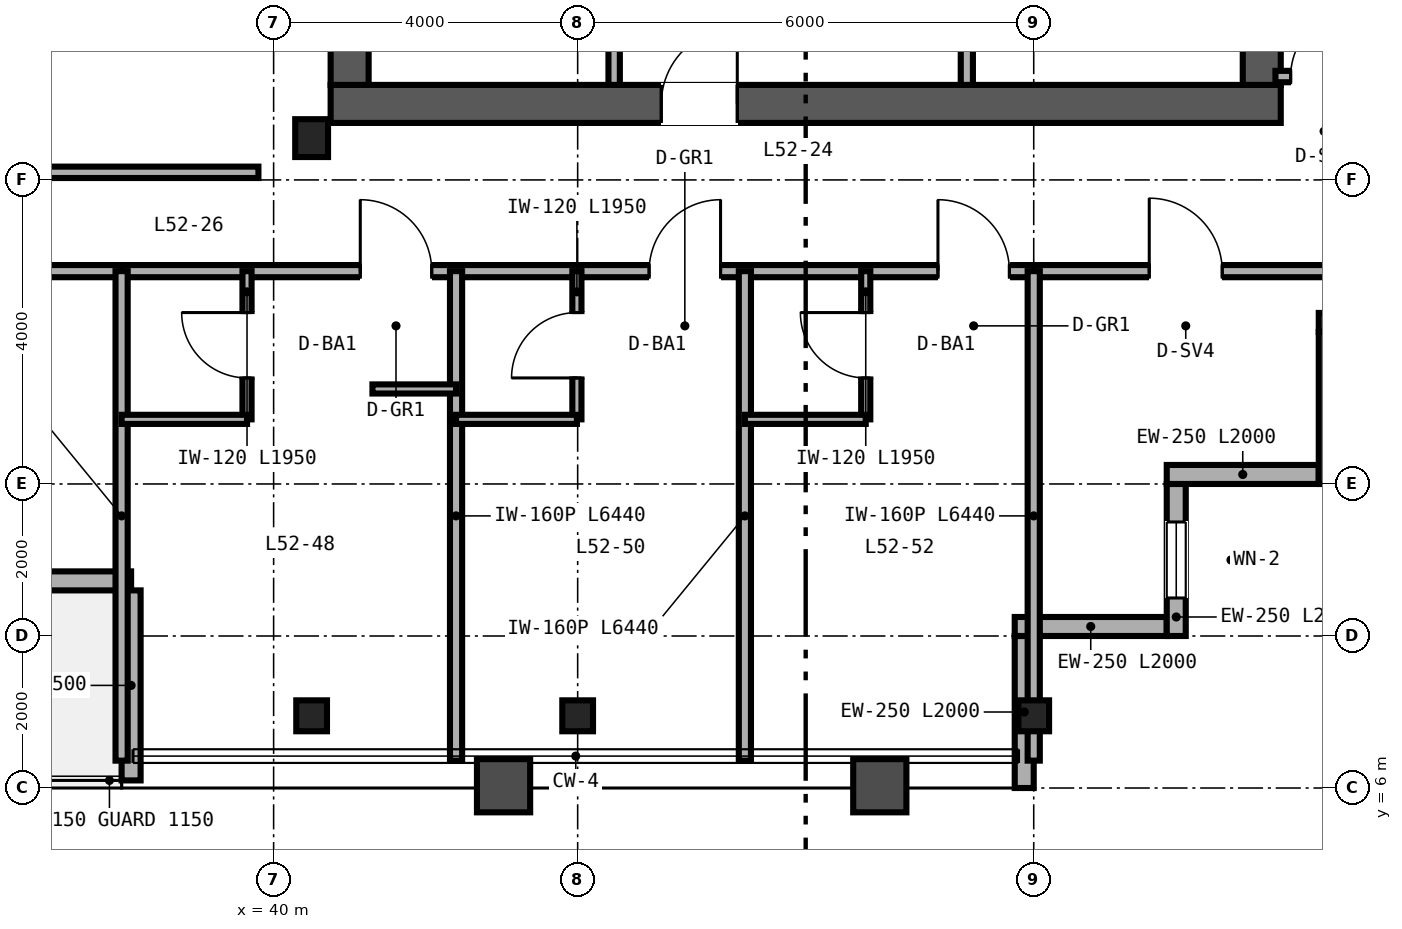
"""IFC4 building model, lengths in metres.
Left out: names, types, materials, properties, quantities, classifications, styles, units other than length and angle.
Written with IfcOpenShell. Run it as: python <this file> out.ifc"""

import sys

from ifc_helpers import new_model, si_unit, direction, frame, frame_2d, origin, origin_2d, place, context, subcontext, project, spatial, rectangle, i_section, extrude, source, transform, mapped, element, fill, save


model = new_model("IFC4")
c1 = context("Model", 3, precision=1e-05, world=origin(), true_north=direction((0.0, 1.0)))
c2 = subcontext(c1, "Body", "Model", "MODEL_VIEW")
j1 = project(units=[si_unit("LENGTHUNIT", "METRE"), si_unit("PLANEANGLEUNIT", "RADIAN")], contexts=[c1])
p1 = place(None, origin())
s1 = spatial("IfcSite", under=j1, at=p1, CompositionType="ELEMENT")
p2 = place(p1, origin())
s2 = spatial("IfcBuilding", under=s1, at=p2, CompositionType="ELEMENT")
p3 = place(p2, frame((0.0, 0.0, 206.4)))
s3 = spatial("IfcBuildingStorey", under=s2, at=p3, CompositionType="ELEMENT", Elevation=206.4)
p4 = place(p3, frame((40.75, 15.0, 0.0), z_axis=(0.0, 0.0, 1.0), x_axis=(1.0, 0.0, 0.0)))
e1 = element("IfcWall", 1, at=p4, inside=s3, PredefinedType="SHEAR", context=c2, shape_type="SweptSolid", body=[
    extrude(rectangle(XDim=12.5, YDim=0.5, at=frame_2d((6.25, 0.0))), origin(), (0.0, 0.0, 1.0), 3.37),
])
p5 = place(p4, frame((4.35, 0.0, 0.0)))
e2 = element("IfcOpeningElement", 2, at=p5, cuts=e1, PredefinedType="OPENING", context=c2, shape_type="SweptSolid", body=[
    extrude(rectangle(XDim=1.0, YDim=2.15, at=frame_2d((0.5, 1.075))), frame((0.0, 0.26, 0.0), z_axis=(0.0, -1.0, 0.0), x_axis=(1.0, 0.0, 0.0)), (0.0, 0.0, 1.0), 0.52),
])
for number, where, z_axis, x_axis in (
    (3, (41.0, 15.25, 0.0), (0.0, 0.0, 1.0), (0.0, 1.0, 0.0)),
    (4, (53.0, 15.25, 0.0), (0.0, 0.0, 1.0), (0.0, 1.0, 0.0)),
):
    element("IfcWall", number, at=place(p3, frame(where, z_axis=z_axis, x_axis=x_axis)), inside=s3, PredefinedType="SHEAR", context=c2, shape_type="SweptSolid", body=[
        extrude(rectangle(XDim=21.5, YDim=0.5, at=frame_2d((10.75, 0.0))), origin(), (0.0, 0.0, 1.0), 3.37),
    ])
m1 = source(origin(), c2, "Body", "SweptSolid", [
    extrude(i_section(OverallWidth=0.432, OverallDepth=0.498, WebThickness=0.056, FlangeThickness=0.089, FilletRadius=0.025, at=origin_2d()), origin(), (0.0, 0.0, 1.0), 3.37),
])
p6 = place(p3, frame((40.5, 14.55, 0.0), z_axis=(0.0, 0.0, 1.0), x_axis=(1.0, 0.0, 0.0)))
e5 = element("IfcColumn", 5, at=p6, inside=s3, PredefinedType="COLUMN", context=c2, shape_type="MappedRepresentation", body=[
    mapped(m1, transform((0.0, 0.0, 0.0), scale=1.0)),
])
m2 = source(origin(), c2, "Body", "SweptSolid", [
    extrude(i_section(OverallWidth=0.404, OverallDepth=0.407, WebThickness=0.027, FlangeThickness=0.044, FilletRadius=0.025, at=origin_2d()), origin(), (0.0, 0.0, 1.0), 3.37),
])
for number, where, z_axis, x_axis in (
    (6, (40.5, 6.95, 0.0), (0.0, 0.0, 1.0), (1.0, 0.0, 0.0)),
    (7, (44.0, 6.95, 0.0), (0.0, 0.0, 1.0), (1.0, 0.0, 0.0)),
    (8, (50.0, 6.95, 0.0), (0.0, 0.0, 1.0), (1.0, 0.0, 0.0)),
):
    element("IfcColumn", number, at=place(p3, frame(where, z_axis=z_axis, x_axis=x_axis)), inside=s3, PredefinedType="COLUMN", context=c2, shape_type="MappedRepresentation", body=[
        mapped(m2, transform((0.0, 0.0, 0.0), scale=1.0)),
    ])
p7 = place(p3, frame((49.875, 6.0, 0.0), z_axis=(0.0, 0.0, 1.0), x_axis=(0.0, 1.0, 0.0)))
e9 = element("IfcWall", 9, at=p7, inside=s3, PredefinedType="SOLIDWALL", context=c2, shape_type="SweptSolid", body=[
    extrude(rectangle(XDim=2.0, YDim=0.25, at=frame_2d((1.0, 0.0))), origin(), (0.0, 0.0, 1.0), 2.677),
])
p8 = place(p3, frame((49.75, 8.125, 0.0), z_axis=(0.0, 0.0, 1.0), x_axis=(1.0, 0.0, 0.0)))
e10 = element("IfcWall", 10, at=p8, inside=s3, PredefinedType="SOLIDWALL", context=c2, shape_type="SweptSolid", body=[
    extrude(rectangle(XDim=2.0, YDim=0.25, at=frame_2d((1.0, 0.0))), origin(), (0.0, 0.0, 1.0), 3.37),
])
p9 = place(p3, frame((51.875, 8.0, 0.0), z_axis=(0.0, 0.0, 1.0), x_axis=(0.0, 1.0, 0.0)))
e11 = element("IfcWall", 11, at=p9, inside=s3, PredefinedType="SOLIDWALL", context=c2, shape_type="SweptSolid", body=[
    extrude(rectangle(XDim=2.0, YDim=0.25, at=frame_2d((1.0, 0.0))), origin(), (0.0, 0.0, 1.0), 3.37),
])
p10 = place(p9, frame((0.5, 0.0, 0.85)))
e12 = element("IfcOpeningElement", 12, at=p10, cuts=e11, PredefinedType="OPENING", context=c2, shape_type="SweptSolid", body=[
    extrude(rectangle(XDim=1.0, YDim=1.9, at=frame_2d((0.5, 0.95))), frame((0.0, 0.135, 0.0), z_axis=(0.0, -1.0, 0.0), x_axis=(1.0, 0.0, 0.0)), (0.0, 0.0, 1.0), 0.27),
])
for number, where, z_axis, x_axis in (
    (13, (51.75, 10.125, 0.0), (0.0, 0.0, 1.0), (1.0, 0.0, 0.0)),
    (14, (53.875, 10.0, 0.0), (0.0, 0.0, 1.0), (0.0, 1.0, 0.0)),
):
    element("IfcWall", number, at=place(p3, frame(where, z_axis=z_axis, x_axis=x_axis)), inside=s3, PredefinedType="SOLIDWALL", context=c2, shape_type="SweptSolid", body=[
        extrude(rectangle(XDim=2.0, YDim=0.25, at=frame_2d((1.0, 0.0))), origin(), (0.0, 0.0, 1.0), 3.37),
    ])
p11 = place(p3, frame((53.75, 12.125, 0.0), z_axis=(0.0, 0.0, 1.0), x_axis=(1.0, 0.0, 0.0)))
e15 = element("IfcWall", 15, at=p11, inside=s3, PredefinedType="SOLIDWALL", context=c2, shape_type="SweptSolid", body=[
    extrude(rectangle(XDim=2.25, YDim=0.25, at=frame_2d((1.125, 0.0))), origin(), (0.0, 0.0, 1.0), 3.37),
])
p12 = place(p3, frame((25.875, 8.725, 0.0), z_axis=(0.0, 0.0, 1.0), x_axis=(1.0, 0.0, 0.0)))
e16 = element("IfcWall", 16, at=p12, inside=s3, PredefinedType="SOLIDWALL", context=c2, shape_type="SweptSolid", body=[
    extrude(rectangle(XDim=12.25, YDim=0.25, at=frame_2d((6.125, 0.0))), origin(), (0.0, 0.0, 1.0), 3.37),
])
p13 = place(p12, frame((5.6, 0.0, 0.0)))
e17 = element("IfcOpeningElement", 17, at=p13, cuts=e16, PredefinedType="OPENING", context=c2, shape_type="SweptSolid", body=[
    extrude(rectangle(XDim=1.05, YDim=2.15, at=frame_2d((0.525, 1.075))), frame((0.0, 0.135, 0.0), z_axis=(0.0, -1.0, 0.0), x_axis=(1.0, 0.0, 0.0)), (0.0, 0.0, 1.0), 0.27),
])
p14 = place(p3, frame((38.125, 6.1, 0.0), z_axis=(0.0, 0.0, 1.0), x_axis=(0.0, 1.0, 0.0)))
e18 = element("IfcWall", 18, at=p14, inside=s3, PredefinedType="SOLIDWALL", context=c2, shape_type="SweptSolid", body=[
    extrude(rectangle(XDim=2.5, YDim=0.25, at=frame_2d((1.25, 0.0))), origin(), (0.0, 0.0, 1.0), 2.443),
])
p15 = place(p3, frame((49.12, 15.25, 0.0), z_axis=(0.0, 0.0, 1.0), x_axis=(0.0, 1.0, 0.0)))
e19 = element("IfcWall", 19, at=p15, inside=s3, PredefinedType="PARTITIONING", context=c2, shape_type="SweptSolid", body=[
    extrude(rectangle(XDim=16.13, YDim=0.16, at=frame_2d((8.065, 0.0))), origin(), (0.0, 0.0, 1.0), 2.443),
])
p16 = place(p15, frame((4.0, 0.0, 0.0)))
e20 = element("IfcOpeningElement", 20, at=p16, cuts=e19, PredefinedType="OPENING", context=c2, shape_type="SweptSolid", body=[
    extrude(rectangle(XDim=0.92, YDim=2.15, at=frame_2d((0.46, 1.075))), frame((0.0, 0.09, 0.0), z_axis=(0.0, -1.0, 0.0), x_axis=(1.0, 0.0, 0.0)), (0.0, 0.0, 1.0), 0.18),
])
p17 = place(p15, frame((12.0, 0.0, 0.0)))
e21 = element("IfcOpeningElement", 21, at=p17, cuts=e19, PredefinedType="OPENING", context=c2, shape_type="SweptSolid", body=[
    extrude(rectangle(XDim=0.92, YDim=2.15, at=frame_2d((0.46, 1.075))), frame((0.0, 0.09, 0.0), z_axis=(0.0, -1.0, 0.0), x_axis=(1.0, 0.0, 0.0)), (0.0, 0.0, 1.0), 0.18),
])
p18 = place(p3, frame((44.48, 15.25, 0.0), z_axis=(0.0, 0.0, 1.0), x_axis=(0.0, 1.0, 0.0)))
e22 = element("IfcWall", 22, at=p18, inside=s3, PredefinedType="PARTITIONING", context=c2, shape_type="SweptSolid", body=[
    extrude(rectangle(XDim=11.63, YDim=0.15, at=frame_2d((5.815, 0.0))), origin(), (0.0, 0.0, 1.0), 3.37),
])
p19 = place(p18, frame((4.5, 0.0, 0.0)))
e23 = element("IfcOpeningElement", 23, at=p19, cuts=e22, PredefinedType="OPENING", context=c2, shape_type="SweptSolid", body=[
    extrude(rectangle(XDim=0.92, YDim=2.15, at=frame_2d((0.46, 1.075))), frame((0.0, 0.085, 0.0), z_axis=(0.0, -1.0, 0.0), x_axis=(1.0, 0.0, 0.0)), (0.0, 0.0, 1.0), 0.17),
])
p20 = place(p3, frame((24.2, 14.1, 0.0), z_axis=(0.0, 0.0, 1.0), x_axis=(1.0, 0.0, 0.0)))
e24 = element("IfcWall", 24, at=p20, inside=s3, PredefinedType="PARTITIONING", context=c2, shape_type="SweptSolid", body=[
    extrude(rectangle(XDim=15.6, YDim=0.15, at=frame_2d((7.8, 0.0))), origin(), (0.0, 0.0, 1.0), 3.37),
])
p21 = place(p20, frame((3.0, 0.0, 0.0)))
e25 = element("IfcOpeningElement", 25, at=p21, cuts=e24, PredefinedType="OPENING", context=c2, shape_type="SweptSolid", body=[
    extrude(rectangle(XDim=0.9, YDim=2.15, at=frame_2d((0.45, 1.075))), frame((0.0, 0.085, 0.0), z_axis=(0.0, -1.0, 0.0), x_axis=(1.0, 0.0, 0.0)), (0.0, 0.0, 1.0), 0.17),
])
p22 = place(p20, frame((11.0, 0.0, 0.0)))
e26 = element("IfcOpeningElement", 26, at=p22, cuts=e24, PredefinedType="OPENING", context=c2, shape_type="SweptSolid", body=[
    extrude(rectangle(XDim=0.9, YDim=2.15, at=frame_2d((0.45, 1.075))), frame((0.0, 0.085, 0.0), z_axis=(0.0, -1.0, 0.0), x_axis=(1.0, 0.0, 0.0)), (0.0, 0.0, 1.0), 0.17),
])
p23 = place(p3, frame((53.18, 15.36, 0.0), z_axis=(0.0, 0.0, 1.0), x_axis=(1.0, 0.0, 0.0)))
e27 = element("IfcWall", 27, at=p23, inside=s3, PredefinedType="PARTITIONING", context=c2, shape_type="SweptSolid", body=[
    extrude(rectangle(XDim=2.66, YDim=0.15, at=frame_2d((1.33, 0.0))), origin(), (0.0, 0.0, 1.0), 2.591),
])
p24 = place(p23, frame((0.2, 0.0, 0.0)))
e28 = element("IfcOpeningElement", 28, at=p24, cuts=e27, PredefinedType="OPENING", context=c2, shape_type="SweptSolid", body=[
    extrude(rectangle(XDim=0.88, YDim=2.15, at=frame_2d((0.44, 1.075))), frame((0.0, 0.085, 0.0), z_axis=(0.0, -1.0, 0.0), x_axis=(1.0, 0.0, 0.0)), (0.0, 0.0, 1.0), 0.17),
])
p25 = place(p3, frame((50.0, 12.8, 0.0), z_axis=(0.0, 0.0, 1.0), x_axis=(1.0, 0.0, 0.0)))
e29 = element("IfcWall", 29, at=p25, inside=s3, PredefinedType="PARTITIONING", context=c2, shape_type="SweptSolid", body=[
    extrude(rectangle(XDim=4.0, YDim=0.16, at=frame_2d((2.0, 0.0))), origin(), (0.0, 0.0, 1.0), 3.37),
])
p26 = place(p25, frame((1.52, 0.0, 0.0)))
e30 = element("IfcOpeningElement", 30, at=p26, cuts=e29, PredefinedType="OPENING", context=c2, shape_type="SweptSolid", body=[
    extrude(rectangle(XDim=0.96, YDim=2.15, at=frame_2d((0.48, 1.075))), frame((0.0, 0.09, 0.0), z_axis=(0.0, -1.0, 0.0), x_axis=(1.0, 0.0, 0.0)), (0.0, 0.0, 1.0), 0.18),
])
p27 = place(p3, frame((26.0, 12.8, 0.0), z_axis=(0.0, 0.0, 1.0), x_axis=(1.0, 0.0, 0.0)))
e31 = element("IfcWall", 31, at=p27, inside=s3, PredefinedType="PARTITIONING", context=c2, shape_type="SweptSolid", body=[
    extrude(rectangle(XDim=12.0, YDim=0.16, at=frame_2d((6.0, 0.0))), origin(), (0.0, 0.0, 1.0), 3.37),
])
p28 = place(p27, frame((5.2, 0.0, 0.0)))
e32 = element("IfcOpeningElement", 32, at=p28, cuts=e31, PredefinedType="OPENING", context=c2, shape_type="SweptSolid", body=[
    extrude(rectangle(XDim=0.96, YDim=2.15, at=frame_2d((0.48, 1.075))), frame((0.0, 0.09, 0.0), z_axis=(0.0, -1.0, 0.0), x_axis=(1.0, 0.0, 0.0)), (0.0, 0.0, 1.0), 0.18),
])
p29 = place(p3, frame((38.0, 12.8, 0.0), z_axis=(0.0, 0.0, 1.0), x_axis=(1.0, 0.0, 0.0)))
e33 = element("IfcWall", 33, at=p29, inside=s3, PredefinedType="PARTITIONING", context=c2, shape_type="SweptSolid", body=[
    extrude(rectangle(XDim=12.0, YDim=0.16, at=frame_2d((6.0, 0.0))), origin(), (0.0, 0.0, 1.0), 2.913),
])
p30 = place(p29, frame((3.14, 0.0, 0.0)))
e34 = element("IfcOpeningElement", 34, at=p30, cuts=e33, PredefinedType="OPENING", context=c2, shape_type="SweptSolid", body=[
    extrude(rectangle(XDim=0.94, YDim=2.15, at=frame_2d((0.47, 1.075))), frame((0.0, 0.09, 0.0), z_axis=(0.0, -1.0, 0.0), x_axis=(1.0, 0.0, 0.0)), (0.0, 0.0, 1.0), 0.18),
])
p31 = place(p29, frame((6.94, 0.0, 0.0)))
e35 = element("IfcOpeningElement", 35, at=p31, cuts=e33, PredefinedType="OPENING", context=c2, shape_type="SweptSolid", body=[
    extrude(rectangle(XDim=0.94, YDim=2.15, at=frame_2d((0.47, 1.075))), frame((0.0, 0.09, 0.0), z_axis=(0.0, -1.0, 0.0), x_axis=(1.0, 0.0, 0.0)), (0.0, 0.0, 1.0), 0.18),
])
p32 = place(p29, frame((10.74, 0.0, 0.0)))
e36 = element("IfcOpeningElement", 36, at=p32, cuts=e33, PredefinedType="OPENING", context=c2, shape_type="SweptSolid", body=[
    extrude(rectangle(XDim=0.94, YDim=2.15, at=frame_2d((0.47, 1.075))), frame((0.0, 0.09, 0.0), z_axis=(0.0, -1.0, 0.0), x_axis=(1.0, 0.0, 0.0)), (0.0, 0.0, 1.0), 0.18),
])
p33 = place(p3, frame((38.0, 6.36, 0.0), z_axis=(0.0, 0.0, 1.0), x_axis=(0.0, 1.0, 0.0)))
e37 = element("IfcWall", 37, at=p33, inside=s3, PredefinedType="PARTITIONING", context=c2, shape_type="SweptSolid", body=[
    extrude(rectangle(XDim=6.44, YDim=0.16, at=frame_2d((3.22, 0.0))), origin(), (0.0, 0.0, 1.0), 2.443),
])
p34 = place(p3, frame((50.0, 6.36, 0.0), z_axis=(0.0, 0.0, 1.0), x_axis=(0.0, 1.0, 0.0)))
e38 = element("IfcWall", 38, at=p34, inside=s3, PredefinedType="PARTITIONING", context=c2, shape_type="SweptSolid", body=[
    extrude(rectangle(XDim=6.44, YDim=0.16, at=frame_2d((3.22, 0.0))), origin(), (0.0, 0.0, 1.0), 2.677),
])
p35 = place(p3, frame((42.4, 6.36, 0.0), z_axis=(0.0, 0.0, 1.0), x_axis=(0.0, 1.0, 0.0)))
e39 = element("IfcWall", 39, at=p35, inside=s3, PredefinedType="PARTITIONING", context=c2, shape_type="SweptSolid", body=[
    extrude(rectangle(XDim=6.44, YDim=0.16, at=frame_2d((3.22, 0.0))), origin(), (0.0, 0.0, 1.0), 2.833),
])
p36 = place(p3, frame((39.65, 10.85, 0.0), z_axis=(0.0, 0.0, 1.0), x_axis=(0.0, 1.0, 0.0)))
e40 = element("IfcWall", 40, at=p36, inside=s3, PredefinedType="PARTITIONING", context=c2, shape_type="SweptSolid", body=[
    extrude(rectangle(XDim=1.95, YDim=0.12, at=frame_2d((0.975, 0.0))), origin(), (0.0, 0.0, 1.0), 3.37),
])
p37 = place(p36, frame((0.545, 0.0, 0.0)))
e41 = element("IfcOpeningElement", 41, at=p37, cuts=e40, PredefinedType="OPENING", context=c2, shape_type="SweptSolid", body=[
    extrude(rectangle(XDim=0.86, YDim=2.1, at=frame_2d((0.43, 1.05))), frame((0.0, 0.07, 0.0), z_axis=(0.0, -1.0, 0.0), x_axis=(1.0, 0.0, 0.0)), (0.0, 0.0, 1.0), 0.14),
])
p38 = place(p3, frame((38.0, 10.85, 0.0), z_axis=(0.0, 0.0, 1.0), x_axis=(1.0, 0.0, 0.0)))
e42 = element("IfcWall", 42, at=p38, inside=s3, PredefinedType="PARTITIONING", context=c2, shape_type="SweptSolid", body=[
    extrude(rectangle(XDim=1.65, YDim=0.12, at=frame_2d((0.825, 0.0))), origin(), (0.0, 0.0, 1.0), 3.37),
])
p39 = place(p3, frame((41.3, 11.25, 0.0), z_axis=(0.0, 0.0, 1.0), x_axis=(1.0, 0.0, 0.0)))
e43 = element("IfcWall", 43, at=p39, inside=s3, PredefinedType="PARTITIONING", context=c2, shape_type="SweptSolid", body=[
    extrude(rectangle(XDim=1.1, YDim=0.12, at=frame_2d((0.55, 0.0))), origin(), (0.0, 0.0, 1.0), 3.37),
])
p40 = place(p3, frame((46.2, 6.36, 0.0), z_axis=(0.0, 0.0, 1.0), x_axis=(0.0, 1.0, 0.0)))
e44 = element("IfcWall", 44, at=p40, inside=s3, PredefinedType="PARTITIONING", context=c2, shape_type="SweptSolid", body=[
    extrude(rectangle(XDim=6.44, YDim=0.16, at=frame_2d((3.22, 0.0))), origin(), (0.0, 0.0, 1.0), 2.677),
])
p41 = place(p3, frame((43.99, 10.85, 0.0), z_axis=(0.0, 0.0, 1.0), x_axis=(0.0, 1.0, 0.0)))
e45 = element("IfcWall", 45, at=p41, inside=s3, PredefinedType="PARTITIONING", context=c2, shape_type="SweptSolid", body=[
    extrude(rectangle(XDim=1.95, YDim=0.12, at=frame_2d((0.975, 0.0))), origin(), (0.0, 0.0, 1.0), 3.37),
])
p42 = place(p41, frame((0.545, 0.0, 0.0)))
e46 = element("IfcOpeningElement", 46, at=p42, cuts=e45, PredefinedType="OPENING", context=c2, shape_type="SweptSolid", body=[
    extrude(rectangle(XDim=0.86, YDim=2.1, at=frame_2d((0.43, 1.05))), frame((0.0, 0.07, 0.0), z_axis=(0.0, -1.0, 0.0), x_axis=(1.0, 0.0, 0.0)), (0.0, 0.0, 1.0), 0.14),
])
p43 = place(p3, frame((42.4, 10.85, 0.0), z_axis=(0.0, 0.0, 1.0), x_axis=(1.0, 0.0, 0.0)))
e47 = element("IfcWall", 47, at=p43, inside=s3, PredefinedType="PARTITIONING", context=c2, shape_type="SweptSolid", body=[
    extrude(rectangle(XDim=1.59, YDim=0.12, at=frame_2d((0.795, 0.0))), origin(), (0.0, 0.0, 1.0), 3.37),
])
p44 = place(p3, frame((47.79, 10.85, 0.0), z_axis=(0.0, 0.0, 1.0), x_axis=(0.0, 1.0, 0.0)))
e48 = element("IfcWall", 48, at=p44, inside=s3, PredefinedType="PARTITIONING", context=c2, shape_type="SweptSolid", body=[
    extrude(rectangle(XDim=1.95, YDim=0.12, at=frame_2d((0.975, 0.0))), origin(), (0.0, 0.0, 1.0), 3.37),
])
p45 = place(p44, frame((0.545, 0.0, 0.0)))
e49 = element("IfcOpeningElement", 49, at=p45, cuts=e48, PredefinedType="OPENING", context=c2, shape_type="SweptSolid", body=[
    extrude(rectangle(XDim=0.86, YDim=2.1, at=frame_2d((0.43, 1.05))), frame((0.0, 0.07, 0.0), z_axis=(0.0, -1.0, 0.0), x_axis=(1.0, 0.0, 0.0)), (0.0, 0.0, 1.0), 0.14),
])
p46 = place(p3, frame((46.2, 10.85, 0.0), z_axis=(0.0, 0.0, 1.0), x_axis=(1.0, 0.0, 0.0)))
e50 = element("IfcWall", 50, at=p46, inside=s3, PredefinedType="PARTITIONING", context=c2, shape_type="SweptSolid", body=[
    extrude(rectangle(XDim=1.59, YDim=0.12, at=frame_2d((0.795, 0.0))), origin(), (0.0, 0.0, 1.0), 3.37),
])
m3 = source(origin(), c2, "Body", "SweptSolid", [
    extrude(rectangle(XDim=1.0, YDim=1.9, at=frame_2d((0.5, 0.95))), frame((0.0, 0.03, 0.0), z_axis=(0.0, -1.0, 0.0), x_axis=(1.0, 0.0, 0.0)), (0.0, 0.0, 1.0), 0.06),
])
p47 = place(p10, origin())
e51 = element("IfcWindow", 51, at=p47, inside=s3, PartitioningType="SINGLE_PANEL", PredefinedType="WINDOW", context=c2, shape_type="MappedRepresentation", body=[
    mapped(m3, transform((0.0, 0.0, 0.0), scale=1.0)),
])
fill(e12, e51)
m4 = source(origin(), c2, "Body", "SweptSolid", [
    extrude(rectangle(XDim=1.0, YDim=2.15, at=frame_2d((0.5, 1.075))), frame((0.0, 0.025, 0.0), z_axis=(0.0, -1.0, 0.0), x_axis=(1.0, 0.0, 0.0)), (0.0, 0.0, 1.0), 0.05),
])
p48 = place(p5, origin())
e52 = element("IfcDoor", 52, at=p48, inside=s3, OperationType="SINGLE_SWING_RIGHT", PredefinedType="DOOR", context=c2, shape_type="MappedRepresentation", body=[
    mapped(m4, transform((0.0, 0.0, 0.0), scale=1.0)),
])
fill(e2, e52)
m5 = source(origin(), c2, "Body", "SweptSolid", [
    extrude(rectangle(XDim=0.88, YDim=2.15, at=frame_2d((0.44, 1.075))), frame((0.0, 0.025, 0.0), z_axis=(0.0, -1.0, 0.0), x_axis=(1.0, 0.0, 0.0)), (0.0, 0.0, 1.0), 0.05),
])
p49 = place(p24, origin())
e53 = element("IfcDoor", 53, at=p49, inside=s3, OperationType="SINGLE_SWING_RIGHT", PredefinedType="DOOR", context=c2, shape_type="MappedRepresentation", body=[
    mapped(m5, transform((0.0, 0.0, 0.0), scale=1.0)),
])
fill(e28, e53)
m6 = source(origin(), c2, "Body", "SweptSolid", [
    extrude(rectangle(XDim=0.96, YDim=2.15, at=frame_2d((0.48, 1.075))), frame((0.0, 0.025, 0.0), z_axis=(0.0, -1.0, 0.0), x_axis=(1.0, 0.0, 0.0)), (0.0, 0.0, 1.0), 0.05),
])
p50 = place(p26, origin())
e54 = element("IfcDoor", 54, at=p50, inside=s3, OperationType="SINGLE_SWING_LEFT", PredefinedType="DOOR", context=c2, shape_type="MappedRepresentation", body=[
    mapped(m6, transform((0.0, 0.0, 0.0), scale=1.0)),
])
fill(e30, e54)
m7 = source(origin(), c2, "Body", "SweptSolid", [
    extrude(rectangle(XDim=0.86, YDim=2.1, at=frame_2d((0.43, 1.05))), frame((0.0, 0.025, 0.0), z_axis=(0.0, -1.0, 0.0), x_axis=(1.0, 0.0, 0.0)), (0.0, 0.0, 1.0), 0.05),
])
p51 = place(p37, origin())
e55 = element("IfcDoor", 55, at=p51, inside=s3, OperationType="SINGLE_SWING_RIGHT", PredefinedType="DOOR", context=c2, shape_type="MappedRepresentation", body=[
    mapped(m7, transform((0.0, 0.0, 0.0), scale=1.0)),
])
fill(e41, e55)
p52 = place(p42, origin())
e56 = element("IfcDoor", 56, at=p52, inside=s3, OperationType="SINGLE_SWING_LEFT", PredefinedType="DOOR", context=c2, shape_type="MappedRepresentation", body=[
    mapped(m7, transform((0.0, 0.0, 0.0), scale=1.0)),
])
fill(e46, e56)
p53 = place(p45, origin())
e57 = element("IfcDoor", 57, at=p53, inside=s3, OperationType="SINGLE_SWING_RIGHT", PredefinedType="DOOR", context=c2, shape_type="MappedRepresentation", body=[
    mapped(m7, transform((0.0, 0.0, 0.0), scale=1.0)),
])
fill(e49, e57)
m8 = source(origin(), c2, "Body", "SweptSolid", [
    extrude(rectangle(XDim=0.94, YDim=2.15, at=frame_2d((0.47, 1.075))), frame((0.0, 0.025, 0.0), z_axis=(0.0, -1.0, 0.0), x_axis=(1.0, 0.0, 0.0)), (0.0, 0.0, 1.0), 0.05),
])
p54 = place(p30, origin())
e58 = element("IfcDoor", 58, at=p54, inside=s3, OperationType="SINGLE_SWING_LEFT", PredefinedType="DOOR", context=c2, shape_type="MappedRepresentation", body=[
    mapped(m8, transform((0.0, 0.0, 0.0), scale=1.0)),
])
fill(e34, e58)
p55 = place(p31, origin())
e59 = element("IfcDoor", 59, at=p55, inside=s3, OperationType="SINGLE_SWING_RIGHT", PredefinedType="DOOR", context=c2, shape_type="MappedRepresentation", body=[
    mapped(m8, transform((0.0, 0.0, 0.0), scale=1.0)),
])
fill(e35, e59)
p56 = place(p32, origin())
e60 = element("IfcDoor", 60, at=p56, inside=s3, OperationType="SINGLE_SWING_LEFT", PredefinedType="DOOR", context=c2, shape_type="MappedRepresentation", body=[
    mapped(m8, transform((0.0, 0.0, 0.0), scale=1.0)),
])
fill(e36, e60)
save(model, sys.argv[1])
